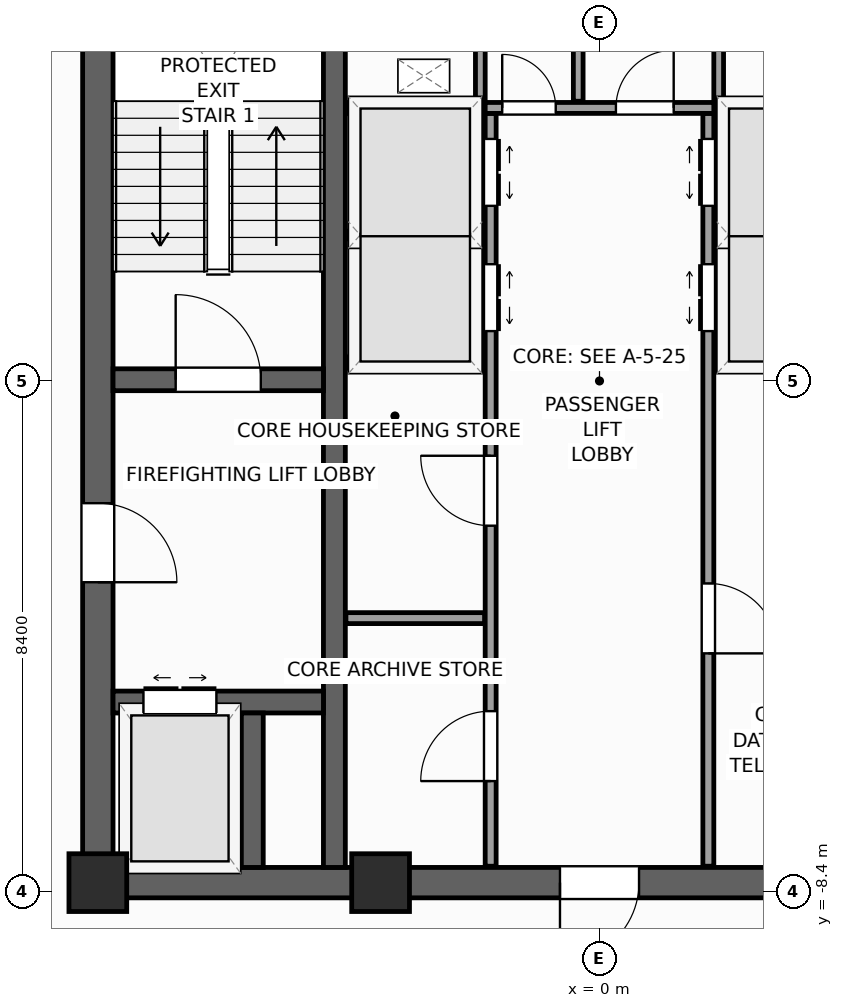
"""IFC4 building model, lengths in metres.
Left out: names, types, materials, properties, quantities, classifications, styles, units other than length and angle.
Written with IfcOpenShell. Run it as: python <this file> out.ifc"""

import sys

from ifc_helpers import new_model, si_unit, direction, frame, frame_2d, origin, origin_2d, place, context, subcontext, project, spatial, rectangle, extrude, source, transform, mapped, element, fill, save


model = new_model("IFC4")
c1 = context("Model", 3, precision=1e-05, world=origin(), true_north=direction((0.0, 1.0)))
c2 = subcontext(c1, "Body", "Model", "MODEL_VIEW")
j1 = project(units=[si_unit("LENGTHUNIT", "METRE"), si_unit("PLANEANGLEUNIT", "RADIAN")], contexts=[c1])
p1 = place(None, origin())
s1 = spatial("IfcSite", under=j1, at=p1, CompositionType="ELEMENT")
p2 = place(p1, origin())
s2 = spatial("IfcBuilding", under=s1, at=p2, CompositionType="ELEMENT")
p3 = place(p2, frame((0.0, 0.0, 256.3)))
s3 = spatial("IfcBuildingStorey", under=s2, at=p3, CompositionType="ELEMENT", Elevation=256.3)
p4 = place(p3, frame((-8.5, -8.25, 0.0), z_axis=(0.0, 0.0, 1.0), x_axis=(1.0, 0.0, 0.0)))
e1 = element("IfcWall", 1, at=p4, inside=s3, PredefinedType="SHEAR", context=c2, shape_type="SweptSolid", body=[
    extrude(rectangle(XDim=17.0, YDim=0.5, at=frame_2d((8.5, 0.0))), origin(), (0.0, 0.0, 1.0), 3.9),
])
p5 = place(p4, frame((7.85, 0.0, 0.0)))
e2 = element("IfcOpeningElement", 2, at=p5, cuts=e1, PredefinedType="OPENING", context=c2, shape_type="SweptSolid", body=[
    extrude(rectangle(XDim=1.3, YDim=2.2, at=frame_2d((0.65, 1.1))), frame((0.0, 0.26, 0.0), z_axis=(0.0, -1.0, 0.0), x_axis=(1.0, 0.0, 0.0)), (0.0, 0.0, 1.0), 0.52),
])
p6 = place(p3, frame((-8.25, -8.0, 0.0), z_axis=(0.0, 0.0, 1.0), x_axis=(0.0, 1.0, 0.0)))
e3 = element("IfcWall", 3, at=p6, inside=s3, PredefinedType="SHEAR", context=c2, shape_type="SweptSolid", body=[
    extrude(rectangle(XDim=16.0, YDim=0.5, at=frame_2d((8.0, 0.0))), origin(), (0.0, 0.0, 1.0), 3.9),
])
p7 = place(p6, frame((4.69, 0.0, 0.0)))
e4 = element("IfcOpeningElement", 4, at=p7, cuts=e3, PredefinedType="OPENING", context=c2, shape_type="SweptSolid", body=[
    extrude(rectangle(XDim=1.3, YDim=2.2, at=frame_2d((0.65, 1.1))), frame((0.0, 0.26, 0.0), z_axis=(0.0, -1.0, 0.0), x_axis=(1.0, 0.0, 0.0)), (0.0, 0.0, 1.0), 0.52),
])
p8 = place(p3, frame((-4.36, -8.0, 0.0), z_axis=(0.0, 0.0, 1.0), x_axis=(0.0, 1.0, 0.0)))
e5 = element("IfcWall", 5, at=p8, inside=s3, PredefinedType="SHEAR", context=c2, shape_type="SweptSolid", body=[
    extrude(rectangle(XDim=16.0, YDim=0.36, at=frame_2d((8.0, 0.0))), origin(), (0.0, 0.0, 1.0), 3.9),
])
p9 = place(p3, frame((-8.0, 0.02, 0.0), z_axis=(0.0, 0.0, 1.0), x_axis=(1.0, 0.0, 0.0)))
e6 = element("IfcWall", 6, at=p9, inside=s3, PredefinedType="SHEAR", context=c2, shape_type="SweptSolid", body=[
    extrude(rectangle(XDim=3.46, YDim=0.36, at=frame_2d((1.73, 0.0))), origin(), (0.0, 0.0, 1.0), 3.9),
])
p10 = place(p9, frame((1.03, 0.0, 0.0)))
e7 = element("IfcOpeningElement", 7, at=p10, cuts=e6, PredefinedType="OPENING", context=c2, shape_type="SweptSolid", body=[
    extrude(rectangle(XDim=1.4, YDim=2.2, at=frame_2d((0.7, 1.1))), frame((0.0, 0.19, 0.0), z_axis=(0.0, -1.0, 0.0), x_axis=(1.0, 0.0, 0.0)), (0.0, 0.0, 1.0), 0.38),
])
p11 = place(p3, frame((-8.0, -5.28, 0.0), z_axis=(0.0, 0.0, 1.0), x_axis=(1.0, 0.0, 0.0)))
e8 = element("IfcWall", 8, at=p11, inside=s3, PredefinedType="SHEAR", context=c2, shape_type="SweptSolid", body=[
    extrude(rectangle(XDim=3.46, YDim=0.36, at=frame_2d((1.73, 0.0))), origin(), (0.0, 0.0, 1.0), 3.9),
])
p12 = place(p11, frame((0.5, 0.0, 0.0)))
e9 = element("IfcOpeningElement", 9, at=p12, cuts=e8, PredefinedType="OPENING", context=c2, shape_type="SweptSolid", body=[
    extrude(rectangle(XDim=1.2, YDim=2.25, at=frame_2d((0.6, 1.125))), frame((0.0, 0.19, 0.0), z_axis=(0.0, -1.0, 0.0), x_axis=(1.0, 0.0, 0.0)), (0.0, 0.0, 1.0), 0.38),
])
p13 = place(p3, frame((-5.71, -8.0, 0.0), z_axis=(0.0, 0.0, 1.0), x_axis=(0.0, 1.0, 0.0)))
e10 = element("IfcWall", 10, at=p13, inside=s3, PredefinedType="SHEAR", context=c2, shape_type="SweptSolid", body=[
    extrude(rectangle(XDim=2.54, YDim=0.36, at=frame_2d((1.27, 0.0))), origin(), (0.0, 0.0, 1.0), 3.9),
])
m1 = source(origin(), c2, "Body", "SweptSolid", [
    extrude(rectangle(XDim=0.95, YDim=0.95, at=origin_2d()), origin(), (0.0, 0.0, 1.0), 3.9),
])
for number, where, z_axis, x_axis in (
    (11, (-8.25, -8.25, 0.0), (0.0, 0.0, 1.0), (1.0, 0.0, 0.0)),
    (12, (-3.6, -8.25, 0.0), (0.0, 0.0, 1.0), (1.0, 0.0, 0.0)),
):
    element("IfcColumn", number, at=place(p3, frame(where, z_axis=z_axis, x_axis=x_axis)), inside=s3, PredefinedType="PILASTER", context=c2, shape_type="MappedRepresentation", body=[
        mapped(m1, transform((0.0, 0.0, 0.0), scale=1.0)),
    ])
p14 = place(p3, frame((-6.733, 29.154, 0.0), z_axis=(0.0, 0.0, 1.0), x_axis=(-0.629325378072, -0.77714192302, 0.0)))
e13 = element("IfcWall", 13, at=p14, inside=s3, PredefinedType="STANDARD", context=c2, shape_type="SweptSolid", body=[
    extrude(rectangle(XDim=36.84, YDim=0.34, at=frame_2d((18.42, 0.0))), origin(), (0.0, 0.0, 1.0), 2.02),
])
p15 = place(p14, frame((23.495, 0.0, 0.0)))
e14 = element("IfcOpeningElement", 14, at=p15, cuts=e13, PredefinedType="OPENING", context=c2, shape_type="SweptSolid", body=[
    extrude(rectangle(XDim=1.05, YDim=2.02, at=frame_2d((0.525, 1.01))), frame((0.0, 0.18, 0.0), z_axis=(0.0, -1.0, 0.0), x_axis=(1.0, 0.0, 0.0)), (0.0, 0.0, 1.0), 0.36),
])
p16 = place(p14, frame((3.421, 0.0, 0.49)))
e15 = element("IfcOpeningElement", 15, at=p16, cuts=e13, PredefinedType="OPENING", context=c2, shape_type="SweptSolid", body=[
    extrude(rectangle(XDim=2.0, YDim=1.45, at=frame_2d((1.0, 0.725))), frame((0.0, 0.18, 0.0), z_axis=(0.0, -1.0, 0.0), x_axis=(1.0, 0.0, 0.0)), (0.0, 0.0, 1.0), 0.36),
])
p17 = place(p14, frame((11.184, 0.0, 0.49)))
e16 = element("IfcOpeningElement", 16, at=p17, cuts=e13, PredefinedType="OPENING", context=c2, shape_type="SweptSolid", body=[
    extrude(rectangle(XDim=2.0, YDim=1.45, at=frame_2d((1.0, 0.725))), frame((0.0, 0.18, 0.0), z_axis=(0.0, -1.0, 0.0), x_axis=(1.0, 0.0, 0.0)), (0.0, 0.0, 1.0), 0.36),
])
p18 = place(p14, frame((15.183, 0.0, 0.49)))
e17 = element("IfcOpeningElement", 17, at=p18, cuts=e13, PredefinedType="OPENING", context=c2, shape_type="SweptSolid", body=[
    extrude(rectangle(XDim=2.0, YDim=1.45, at=frame_2d((1.0, 0.725))), frame((0.0, 0.18, 0.0), z_axis=(0.0, -1.0, 0.0), x_axis=(1.0, 0.0, 0.0)), (0.0, 0.0, 1.0), 0.36),
])
p19 = place(p14, frame((26.301, 0.0, 0.49)))
e18 = element("IfcOpeningElement", 18, at=p19, cuts=e13, PredefinedType="OPENING", context=c2, shape_type="SweptSolid", body=[
    extrude(rectangle(XDim=2.0, YDim=1.45, at=frame_2d((1.0, 0.725))), frame((0.0, 0.18, 0.0), z_axis=(0.0, -1.0, 0.0), x_axis=(1.0, 0.0, 0.0)), (0.0, 0.0, 1.0), 0.36),
])
p20 = place(p14, frame((29.182, 0.0, 0.49)))
e19 = element("IfcOpeningElement", 19, at=p20, cuts=e13, PredefinedType="OPENING", context=c2, shape_type="SweptSolid", body=[
    extrude(rectangle(XDim=2.0, YDim=1.45, at=frame_2d((1.0, 0.725))), frame((0.0, 0.18, 0.0), z_axis=(0.0, -1.0, 0.0), x_axis=(1.0, 0.0, 0.0)), (0.0, 0.0, 1.0), 0.36),
])
p21 = place(p3, frame((-29.154, -6.733, 0.0), z_axis=(0.0, 0.0, 1.0), x_axis=(0.77714192302, -0.629325378072, 0.0)))
e20 = element("IfcWall", 20, at=p21, inside=s3, PredefinedType="STANDARD", context=c2, shape_type="SweptSolid", body=[
    extrude(rectangle(XDim=36.84, YDim=0.34, at=frame_2d((18.42, 0.0))), origin(), (0.0, 0.0, 1.0), 2.02),
])
p22 = place(p21, frame((3.421, 0.0, 0.49)))
e21 = element("IfcOpeningElement", 21, at=p22, cuts=e20, PredefinedType="OPENING", context=c2, shape_type="SweptSolid", body=[
    extrude(rectangle(XDim=2.0, YDim=1.45, at=frame_2d((1.0, 0.725))), frame((0.0, 0.18, 0.0), z_axis=(0.0, -1.0, 0.0), x_axis=(1.0, 0.0, 0.0)), (0.0, 0.0, 1.0), 0.36),
])
p23 = place(p21, frame((9.684, 0.0, 0.49)))
e22 = element("IfcOpeningElement", 22, at=p23, cuts=e20, PredefinedType="OPENING", context=c2, shape_type="SweptSolid", body=[
    extrude(rectangle(XDim=2.0, YDim=1.45, at=frame_2d((1.0, 0.725))), frame((0.0, 0.18, 0.0), z_axis=(0.0, -1.0, 0.0), x_axis=(1.0, 0.0, 0.0)), (0.0, 0.0, 1.0), 0.36),
])
p24 = place(p21, frame((15.183, 0.0, 0.49)))
e23 = element("IfcOpeningElement", 23, at=p24, cuts=e20, PredefinedType="OPENING", context=c2, shape_type="SweptSolid", body=[
    extrude(rectangle(XDim=2.0, YDim=1.45, at=frame_2d((1.0, 0.725))), frame((0.0, 0.18, 0.0), z_axis=(0.0, -1.0, 0.0), x_axis=(1.0, 0.0, 0.0)), (0.0, 0.0, 1.0), 0.36),
])
p25 = place(p21, frame((24.051, 0.0, 0.49)))
e24 = element("IfcOpeningElement", 24, at=p25, cuts=e20, PredefinedType="OPENING", context=c2, shape_type="SweptSolid", body=[
    extrude(rectangle(XDim=2.0, YDim=1.45, at=frame_2d((1.0, 0.725))), frame((0.0, 0.18, 0.0), z_axis=(0.0, -1.0, 0.0), x_axis=(1.0, 0.0, 0.0)), (0.0, 0.0, 1.0), 0.36),
])
p26 = place(p21, frame((30.682, 0.0, 0.49)))
e25 = element("IfcOpeningElement", 25, at=p26, cuts=e20, PredefinedType="OPENING", context=c2, shape_type="SweptSolid", body=[
    extrude(rectangle(XDim=2.0, YDim=1.45, at=frame_2d((1.0, 0.725))), frame((0.0, 0.18, 0.0), z_axis=(0.0, -1.0, 0.0), x_axis=(1.0, 0.0, 0.0)), (0.0, 0.0, 1.0), 0.36),
])
p27 = place(p3, frame((-1.79, -7.98, 0.0), z_axis=(0.0, 0.0, 1.0), x_axis=(0.0, 1.0, 0.0)))
e26 = element("IfcWall", 26, at=p27, inside=s3, PredefinedType="PARTITIONING", context=c2, shape_type="SweptSolid", body=[
    extrude(rectangle(XDim=12.38, YDim=0.18, at=frame_2d((6.19, 0.0))), origin(), (0.0, 0.0, 1.0), 3.5),
])
p28 = place(p27, frame((8.8, 0.0, 0.0)))
e27 = element("IfcOpeningElement", 27, at=p28, cuts=e26, PredefinedType="OPENING", context=c2, shape_type="SweptSolid", body=[
    extrude(rectangle(XDim=1.1, YDim=2.2, at=frame_2d((0.55, 1.1))), frame((0.0, 0.1, 0.0), z_axis=(0.0, -1.0, 0.0), x_axis=(1.0, 0.0, 0.0)), (0.0, 0.0, 1.0), 0.2),
])
p29 = place(p27, frame((10.86, 0.0, 0.0)))
e28 = element("IfcOpeningElement", 28, at=p29, cuts=e26, PredefinedType="OPENING", context=c2, shape_type="SweptSolid", body=[
    extrude(rectangle(XDim=1.1, YDim=2.2, at=frame_2d((0.55, 1.1))), frame((0.0, 0.1, 0.0), z_axis=(0.0, -1.0, 0.0), x_axis=(1.0, 0.0, 0.0)), (0.0, 0.0, 1.0), 0.2),
])
p30 = place(p27, frame((1.4, 0.0, 0.0)))
e29 = element("IfcOpeningElement", 29, at=p30, cuts=e26, PredefinedType="OPENING", context=c2, shape_type="SweptSolid", body=[
    extrude(rectangle(XDim=1.15, YDim=2.25, at=frame_2d((0.575, 1.125))), frame((0.0, 0.1, 0.0), z_axis=(0.0, -1.0, 0.0), x_axis=(1.0, 0.0, 0.0)), (0.0, 0.0, 1.0), 0.2),
])
p31 = place(p27, frame((5.6, 0.0, 0.0)))
e30 = element("IfcOpeningElement", 30, at=p31, cuts=e26, PredefinedType="OPENING", context=c2, shape_type="SweptSolid", body=[
    extrude(rectangle(XDim=1.15, YDim=2.25, at=frame_2d((0.575, 1.125))), frame((0.0, 0.1, 0.0), z_axis=(0.0, -1.0, 0.0), x_axis=(1.0, 0.0, 0.0)), (0.0, 0.0, 1.0), 0.2),
])
p32 = place(p3, frame((1.79, -7.98, 0.0), z_axis=(0.0, 0.0, 1.0), x_axis=(0.0, 1.0, 0.0)))
e31 = element("IfcWall", 31, at=p32, inside=s3, PredefinedType="PARTITIONING", context=c2, shape_type="SweptSolid", body=[
    extrude(rectangle(XDim=12.38, YDim=0.18, at=frame_2d((6.19, 0.0))), origin(), (0.0, 0.0, 1.0), 3.5),
])
p33 = place(p32, frame((8.8, 0.0, 0.0)))
e32 = element("IfcOpeningElement", 32, at=p33, cuts=e31, PredefinedType="OPENING", context=c2, shape_type="SweptSolid", body=[
    extrude(rectangle(XDim=1.1, YDim=2.2, at=frame_2d((0.55, 1.1))), frame((0.0, 0.1, 0.0), z_axis=(0.0, -1.0, 0.0), x_axis=(1.0, 0.0, 0.0)), (0.0, 0.0, 1.0), 0.2),
])
p34 = place(p32, frame((10.86, 0.0, 0.0)))
e33 = element("IfcOpeningElement", 33, at=p34, cuts=e31, PredefinedType="OPENING", context=c2, shape_type="SweptSolid", body=[
    extrude(rectangle(XDim=1.1, YDim=2.2, at=frame_2d((0.55, 1.1))), frame((0.0, 0.1, 0.0), z_axis=(0.0, -1.0, 0.0), x_axis=(1.0, 0.0, 0.0)), (0.0, 0.0, 1.0), 0.2),
])
p35 = place(p32, frame((3.5, 0.0, 0.0)))
e34 = element("IfcOpeningElement", 34, at=p35, cuts=e31, PredefinedType="OPENING", context=c2, shape_type="SweptSolid", body=[
    extrude(rectangle(XDim=1.15, YDim=2.25, at=frame_2d((0.575, 1.125))), frame((0.0, 0.1, 0.0), z_axis=(0.0, -1.0, 0.0), x_axis=(1.0, 0.0, 0.0)), (0.0, 0.0, 1.0), 0.2),
])
p36 = place(p3, frame((-1.88, 4.49, 0.0), z_axis=(0.0, 0.0, 1.0), x_axis=(1.0, 0.0, 0.0)))
e35 = element("IfcWall", 35, at=p36, inside=s3, PredefinedType="PARTITIONING", context=c2, shape_type="SweptSolid", body=[
    extrude(rectangle(XDim=3.76, YDim=0.18, at=frame_2d((1.88, 0.0))), origin(), (0.0, 0.0, 1.0), 3.5),
])
p37 = place(p36, frame((0.28, 0.0, 0.0)))
e36 = element("IfcOpeningElement", 36, at=p37, cuts=e35, PredefinedType="OPENING", context=c2, shape_type="SweptSolid", body=[
    extrude(rectangle(XDim=0.88, YDim=2.1, at=frame_2d((0.44, 1.05))), frame((0.0, 0.1, 0.0), z_axis=(0.0, -1.0, 0.0), x_axis=(1.0, 0.0, 0.0)), (0.0, 0.0, 1.0), 0.2),
])
p38 = place(p36, frame((2.15, 0.0, 0.0)))
e37 = element("IfcOpeningElement", 37, at=p38, cuts=e35, PredefinedType="OPENING", context=c2, shape_type="SweptSolid", body=[
    extrude(rectangle(XDim=0.95, YDim=2.1, at=frame_2d((0.475, 1.05))), frame((0.0, 0.1, 0.0), z_axis=(0.0, -1.0, 0.0), x_axis=(1.0, 0.0, 0.0)), (0.0, 0.0, 1.0), 0.2),
])
for number, where, z_axis, x_axis in (
    (38, (-4.17, -3.9, 0.0), (0.0, 0.0, 1.0), (1.0, 0.0, 0.0)),
    (39, (-4.17, 0.3, 0.0), (0.0, 0.0, 1.0), (1.0, 0.0, 0.0)),
    (40, (1.89, 0.3, 0.0), (0.0, 0.0, 1.0), (1.0, 0.0, 0.0)),
    (41, (-4.17, 4.49, 0.0), (0.0, 0.0, 1.0), (1.0, 0.0, 0.0)),
    (42, (1.89, 4.49, 0.0), (0.0, 0.0, 1.0), (1.0, 0.0, 0.0)),
):
    element("IfcWall", number, at=place(p3, frame(where, z_axis=z_axis, x_axis=x_axis)), inside=s3, PredefinedType="PARTITIONING", context=c2, shape_type="SweptSolid", body=[
        extrude(rectangle(XDim=2.28, YDim=0.18, at=frame_2d((1.14, 0.0))), origin(), (0.0, 0.0, 1.0), 3.5),
    ])
for number, where, z_axis, x_axis in (
    (43, (-4.16, 2.4, 0.0), (0.0, 0.0, 1.0), (1.0, 0.0, 0.0)),
    (44, (1.9, 2.4, 0.0), (0.0, 0.0, 1.0), (1.0, 0.0, 0.0)),
):
    element("IfcWall", number, at=place(p3, frame(where, z_axis=z_axis, x_axis=x_axis)), inside=s3, PredefinedType="PARTITIONING", context=c2, shape_type="SweptSolid", body=[
        extrude(rectangle(XDim=2.26, YDim=0.12, at=frame_2d((1.13, 0.0))), origin(), (0.0, 0.0, 1.0), 3.5),
    ])
for number, where, z_axis, x_axis in (
    (45, (-1.96, 4.58, 0.0), (0.0, 0.0, 1.0), (0.0, 1.0, 0.0)),
    (46, (1.96, 4.58, 0.0), (0.0, 0.0, 1.0), (0.0, 1.0, 0.0)),
):
    element("IfcWall", number, at=place(p3, frame(where, z_axis=z_axis, x_axis=x_axis)), inside=s3, PredefinedType="PARTITIONING", context=c2, shape_type="SweptSolid", body=[
        extrude(rectangle(XDim=3.4, YDim=0.16, at=frame_2d((1.7, 0.0))), origin(), (0.0, 0.0, 1.0), 3.5),
    ])
p39 = place(p3, frame((-0.35, 4.6, 0.0), z_axis=(0.0, 0.0, 1.0), x_axis=(0.0, 1.0, 0.0)))
e47 = element("IfcWall", 47, at=p39, inside=s3, PredefinedType="PARTITIONING", context=c2, shape_type="SweptSolid", body=[
    extrude(rectangle(XDim=3.38, YDim=0.16, at=frame_2d((1.69, 0.0))), origin(), (0.0, 0.0, 1.0), 3.5),
])
m2 = source(origin(), c2, "Body", "SweptSolid", [
    extrude(rectangle(XDim=1.4, YDim=2.2, at=frame_2d((0.7, 1.1))), frame((0.0, 0.025, 0.0), z_axis=(0.0, -1.0, 0.0), x_axis=(1.0, 0.0, 0.0)), (0.0, 0.0, 1.0), 0.05),
])
p40 = place(p10, origin())
e48 = element("IfcDoor", 48, at=p40, inside=s3, OperationType="SINGLE_SWING_LEFT", PredefinedType="DOOR", context=c2, shape_type="MappedRepresentation", body=[
    mapped(m2, transform((0.0, 0.0, 0.0), scale=1.0)),
])
fill(e7, e48)
m3 = source(origin(), c2, "Body", "SweptSolid", [
    extrude(rectangle(XDim=1.3, YDim=2.2, at=frame_2d((0.65, 1.1))), frame((0.0, 0.025, 0.0), z_axis=(0.0, -1.0, 0.0), x_axis=(1.0, 0.0, 0.0)), (0.0, 0.0, 1.0), 0.05),
])
p41 = place(p7, frame((1.3, 0.0, 0.0), z_axis=(0.0, 0.0, 1.0), x_axis=(-1.0, 0.0, 0.0)))
e49 = element("IfcDoor", 49, at=p41, inside=s3, OperationType="SINGLE_SWING_LEFT", PredefinedType="DOOR", context=c2, shape_type="MappedRepresentation", body=[
    mapped(m3, transform((0.0, 0.0, 0.0), scale=1.0)),
])
fill(e4, e49)
p42 = place(p5, frame((1.3, 0.0, 0.0), z_axis=(0.0, 0.0, 1.0), x_axis=(-1.0, 0.0, 0.0)))
e50 = element("IfcDoor", 50, at=p42, inside=s3, OperationType="SINGLE_SWING_LEFT", PredefinedType="DOOR", context=c2, shape_type="MappedRepresentation", body=[
    mapped(m3, transform((0.0, 0.0, 0.0), scale=1.0)),
])
fill(e2, e50)
m4 = source(origin(), c2, "Body", "SweptSolid", [
    extrude(rectangle(XDim=1.2, YDim=2.25, at=frame_2d((0.6, 1.125))), frame((0.0, 0.025, 0.0), z_axis=(0.0, -1.0, 0.0), x_axis=(1.0, 0.0, 0.0)), (0.0, 0.0, 1.0), 0.05),
])
p43 = place(p12, origin())
e51 = element("IfcDoor", 51, at=p43, inside=s3, OperationType="DOUBLE_DOOR_SLIDING", PredefinedType="DOOR", context=c2, shape_type="MappedRepresentation", body=[
    mapped(m4, transform((0.0, 0.0, 0.0), scale=1.0)),
])
fill(e9, e51)
m5 = source(origin(), c2, "Body", "SweptSolid", [
    extrude(rectangle(XDim=1.1, YDim=2.2, at=frame_2d((0.55, 1.1))), frame((0.0, 0.025, 0.0), z_axis=(0.0, -1.0, 0.0), x_axis=(1.0, 0.0, 0.0)), (0.0, 0.0, 1.0), 0.05),
])
p44 = place(p28, frame((1.1, 0.0, 0.0), z_axis=(0.0, 0.0, 1.0), x_axis=(-1.0, 0.0, 0.0)))
e52 = element("IfcDoor", 52, at=p44, inside=s3, OperationType="DOUBLE_DOOR_SLIDING", PredefinedType="DOOR", context=c2, shape_type="MappedRepresentation", body=[
    mapped(m5, transform((0.0, 0.0, 0.0), scale=1.0)),
])
fill(e27, e52)
p45 = place(p29, frame((1.1, 0.0, 0.0), z_axis=(0.0, 0.0, 1.0), x_axis=(-1.0, 0.0, 0.0)))
e53 = element("IfcDoor", 53, at=p45, inside=s3, OperationType="DOUBLE_DOOR_SLIDING", PredefinedType="DOOR", context=c2, shape_type="MappedRepresentation", body=[
    mapped(m5, transform((0.0, 0.0, 0.0), scale=1.0)),
])
fill(e28, e53)
p46 = place(p33, origin())
e54 = element("IfcDoor", 54, at=p46, inside=s3, OperationType="DOUBLE_DOOR_SLIDING", PredefinedType="DOOR", context=c2, shape_type="MappedRepresentation", body=[
    mapped(m5, transform((0.0, 0.0, 0.0), scale=1.0)),
])
fill(e32, e54)
p47 = place(p34, origin())
e55 = element("IfcDoor", 55, at=p47, inside=s3, OperationType="DOUBLE_DOOR_SLIDING", PredefinedType="DOOR", context=c2, shape_type="MappedRepresentation", body=[
    mapped(m5, transform((0.0, 0.0, 0.0), scale=1.0)),
])
fill(e33, e55)
m6 = source(origin(), c2, "Body", "SweptSolid", [
    extrude(rectangle(XDim=1.15, YDim=2.25, at=frame_2d((0.575, 1.125))), frame((0.0, 0.025, 0.0), z_axis=(0.0, -1.0, 0.0), x_axis=(1.0, 0.0, 0.0)), (0.0, 0.0, 1.0), 0.05),
])
p48 = place(p30, origin())
e56 = element("IfcDoor", 56, at=p48, inside=s3, OperationType="SINGLE_SWING_LEFT", PredefinedType="DOOR", context=c2, shape_type="MappedRepresentation", body=[
    mapped(m6, transform((0.0, 0.0, 0.0), scale=1.0)),
])
fill(e29, e56)
p49 = place(p31, origin())
e57 = element("IfcDoor", 57, at=p49, inside=s3, OperationType="SINGLE_SWING_RIGHT", PredefinedType="DOOR", context=c2, shape_type="MappedRepresentation", body=[
    mapped(m6, transform((0.0, 0.0, 0.0), scale=1.0)),
])
fill(e30, e57)
p50 = place(p35, frame((1.15, 0.0, 0.0), z_axis=(0.0, 0.0, 1.0), x_axis=(-1.0, 0.0, 0.0)))
e58 = element("IfcDoor", 58, at=p50, inside=s3, OperationType="SINGLE_SWING_LEFT", PredefinedType="DOOR", context=c2, shape_type="MappedRepresentation", body=[
    mapped(m6, transform((0.0, 0.0, 0.0), scale=1.0)),
])
fill(e34, e58)
m7 = source(origin(), c2, "Body", "SweptSolid", [
    extrude(rectangle(XDim=0.88, YDim=2.1, at=frame_2d((0.44, 1.05))), frame((0.0, 0.025, 0.0), z_axis=(0.0, -1.0, 0.0), x_axis=(1.0, 0.0, 0.0)), (0.0, 0.0, 1.0), 0.05),
])
p51 = place(p37, origin())
e59 = element("IfcDoor", 59, at=p51, inside=s3, OperationType="SINGLE_SWING_LEFT", PredefinedType="DOOR", context=c2, shape_type="MappedRepresentation", body=[
    mapped(m7, transform((0.0, 0.0, 0.0), scale=1.0)),
])
fill(e36, e59)
m8 = source(origin(), c2, "Body", "SweptSolid", [
    extrude(rectangle(XDim=0.95, YDim=2.1, at=frame_2d((0.475, 1.05))), frame((0.0, 0.025, 0.0), z_axis=(0.0, -1.0, 0.0), x_axis=(1.0, 0.0, 0.0)), (0.0, 0.0, 1.0), 0.05),
])
p52 = place(p38, origin())
e60 = element("IfcDoor", 60, at=p52, inside=s3, OperationType="SINGLE_SWING_RIGHT", PredefinedType="DOOR", context=c2, shape_type="MappedRepresentation", body=[
    mapped(m8, transform((0.0, 0.0, 0.0), scale=1.0)),
])
fill(e37, e60)
save(model, sys.argv[1])
